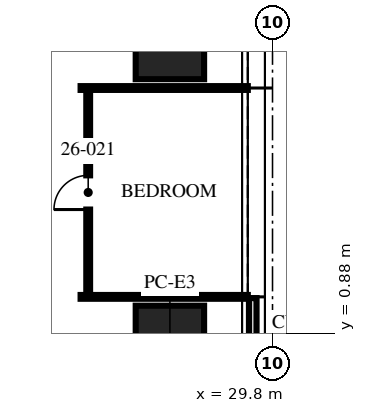
"""IFC4 building model, lengths in metres.
Left out: names, types, materials, properties, quantities, classifications, styles, units other than length and angle.
Written with IfcOpenShell. Run it as: python <this file> out.ifc"""

import sys

from ifc_helpers import new_model, si_unit, direction, frame, frame_2d, origin, origin_2d, place, context, subcontext, project, spatial, rectangle, hollow_rectangle, extrude, element, fill, save


model = new_model("IFC4")
c1 = context("Model", 3, precision=1e-05, world=origin(), true_north=direction((0.0, 1.0)))
c2 = subcontext(c1, "Body", "Model", "MODEL_VIEW")
j1 = project(units=[si_unit("LENGTHUNIT", "METRE"), si_unit("PLANEANGLEUNIT", "RADIAN")], contexts=[c1])
p1 = place(None, origin())
s1 = spatial("IfcSite", under=j1, at=p1, CompositionType="ELEMENT")
p2 = place(p1, origin())
s2 = spatial("IfcBuilding", under=s1, at=p2, CompositionType="ELEMENT")
p3 = place(p2, frame((0.0, 0.0, 107.25)))
s3 = spatial("IfcBuildingStorey", under=s2, at=p3, CompositionType="ELEMENT", Elevation=107.25)
p4 = place(p3, frame((27.1, 9.16, -0.07), z_axis=(0.0, 0.0, 1.0), x_axis=(0.0, 1.0, 0.0)))
e1 = element("IfcColumn", 1, at=p4, inside=s3, PredefinedType="COLUMN", context=c2, shape_type="SweptSolid", body=[
    extrude(hollow_rectangle(XDim=3.2, YDim=1.8, WallThickness=0.2, at=origin_2d()), origin(), (0.0, 0.0, 1.0), 3.82),
])
p5 = place(p3, frame((27.1, 0.0, -0.23), z_axis=(0.0, 0.0, 1.0), x_axis=(0.0, 1.0, 0.0)))
e2 = element("IfcColumn", 2, at=p5, inside=s3, PredefinedType="COLUMN", context=c2, shape_type="SweptSolid", body=[
    extrude(hollow_rectangle(XDim=3.2, YDim=1.8, WallThickness=0.2, at=origin_2d()), origin(), (0.0, 0.0, 1.0), 3.98),
])
p6 = place(p3, frame((29.28, -1.8, 0.0), z_axis=(0.0, 0.0, 1.0), x_axis=(0.0, 1.0, 0.0)))
e3 = element("IfcWall", 3, at=p6, inside=s3, PredefinedType="ELEMENTEDWALL", context=c2, shape_type="SweptSolid", body=[
    extrude(rectangle(XDim=3.599, YDim=0.2, at=frame_2d((1.8, 0.0))), origin(), (0.0, 0.0, 1.0), 3.75),
])
p7 = place(p6, frame((1.3, 0.0, 0.0)))
e4 = element("IfcOpeningElement", 4, at=p7, cuts=e3, PredefinedType="OPENING", context=c2, shape_type="SweptSolid", body=[
    extrude(rectangle(XDim=1.0, YDim=2.4, at=frame_2d((0.5, 1.2))), frame((0.0, 0.11, 0.0), z_axis=(0.0, -1.0, 0.0), x_axis=(1.0, 0.0, 0.0)), (0.0, 0.0, 1.0), 0.22),
])
for number, where, z_axis, x_axis in (
    (5, (24.75, 1.832, 0.0), (0.0, 0.0, 1.0), (1.0, 0.0, 0.0)),
    (6, (24.75, 7.328, 0.0), (0.0, 0.0, 1.0), (1.0, 0.0, 0.0)),
):
    element("IfcWall", number, at=place(p3, frame(where, z_axis=z_axis, x_axis=x_axis)), inside=s3, PredefinedType="PARTITIONING", context=c2, shape_type="SweptSolid", body=[
        extrude(rectangle(XDim=4.4, YDim=0.1, at=frame_2d((2.2, 0.0))), origin(), (0.0, 0.0, 1.0), 2.81),
    ])
p8 = place(p3, frame((24.95, 1.832, 0.0), z_axis=(0.0, 0.0, 1.0), x_axis=(0.0, 1.0, 0.0)))
e7 = element("IfcWall", 7, at=p8, inside=s3, PredefinedType="PARTITIONING", context=c2, shape_type="SweptSolid", body=[
    extrude(rectangle(XDim=5.496, YDim=0.1, at=frame_2d((2.748, 0.0))), origin(), (0.0, 0.0, 1.0), 2.81),
])
p9 = place(p8, frame((2.298, 0.0, 0.0)))
e8 = element("IfcOpeningElement", 8, at=p9, cuts=e7, PredefinedType="OPENING", context=c2, shape_type="SweptSolid", body=[
    extrude(rectangle(XDim=0.9, YDim=2.1, at=frame_2d((0.45, 1.05))), frame((0.0, 0.06, 0.0), z_axis=(0.0, -1.0, 0.0), x_axis=(1.0, 0.0, 0.0)), (0.0, 0.0, 1.0), 0.12),
])
p10 = place(p9, origin())
e9 = element("IfcDoor", 9, at=p10, inside=s3, OperationType="SINGLE_SWING_LEFT", PredefinedType="DOOR", context=c2, shape_type="SweptSolid", body=[
    extrude(rectangle(XDim=0.9, YDim=2.1, at=frame_2d((0.45, 1.05))), frame((0.0, 0.025, 0.0), z_axis=(0.0, -1.0, 0.0), x_axis=(1.0, 0.0, 0.0)), (0.0, 0.0, 1.0), 0.05),
])
fill(e8, e9)
save(model, sys.argv[1])
